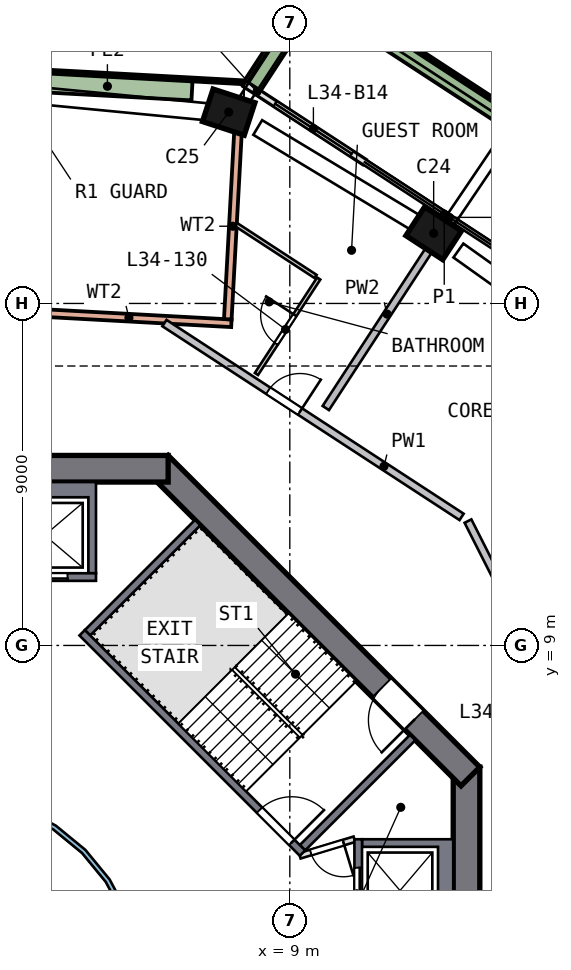
"""IFC4 building model, lengths in metres.
Left out: names, types, materials, properties, quantities, classifications, styles, units other than length and angle.
Written with IfcOpenShell. Run it as: python <this file> out.ifc"""

import sys

from ifc_helpers import new_model, si_unit, direction, frame, frame_2d, origin, origin_2d, place, context, subcontext, project, spatial, polyline, rectangle, outline, extrude, element, fill, save


model = new_model("IFC4")
c1 = context("Model", 3, precision=1e-05, world=origin(), true_north=direction((0.0, 1.0)))
c2 = subcontext(c1, "Body", "Model", "MODEL_VIEW")
j1 = project(units=[si_unit("LENGTHUNIT", "METRE"), si_unit("PLANEANGLEUNIT", "RADIAN")], contexts=[c1])
p1 = place(None, origin())
s1 = spatial("IfcSite", under=j1, at=p1, CompositionType="ELEMENT")
p2 = place(p1, origin())
s2 = spatial("IfcBuilding", under=s1, at=p2, CompositionType="ELEMENT")
p3 = place(p2, frame((0.0, 0.0, 143.5)))
s3 = spatial("IfcBuildingStorey", under=s2, at=p3, CompositionType="ELEMENT", Elevation=143.5)
p4 = place(p3, frame((12.899, 19.773, 0.0), z_axis=(-0.094531133, 0.060536429, 0.993679629), x_axis=(-0.832224418, 0.54295729, -0.112249269)))
e1 = element("IfcColumn", 1, at=p4, inside=s3, PredefinedType="COLUMN", context=c2, shape_type="SweptSolid", body=[
    extrude(rectangle(XDim=1.15, YDim=0.9, at=origin_2d()), origin(), (0.0, 0.0, 1.0), 3.21),
])
p5 = place(p3, frame((7.524, 22.993, 0.0), z_axis=(-0.109630225, 0.034820141, 0.993362357), x_axis=(0.944169139, -0.308730223, 0.115022986)))
e2 = element("IfcColumn", 2, at=p5, inside=s3, PredefinedType="COLUMN", context=c2, shape_type="SweptSolid", body=[
    extrude(rectangle(XDim=1.15, YDim=0.9, at=origin_2d()), origin(), (0.0, 0.0, 1.0), 3.211),
])
p6 = place(p3, frame((13.65, -5.799, 0.0), z_axis=(0.0, 0.0, 1.0), x_axis=(0.0, 1.0, 0.0)))
e3 = element("IfcWall", 3, at=p6, inside=s3, PredefinedType="SHEAR", context=c2, shape_type="SweptSolid", body=[
    extrude(rectangle(XDim=11.598, YDim=0.7, at=frame_2d((5.799, 0.0))), origin(), (0.0, 0.0, 1.0), 3.5),
])
p7 = place(p6, frame((4.899, 0.0, 0.0)))
e4 = element("IfcOpeningElement", 4, at=p7, cuts=e3, PredefinedType="OPENING", context=c2, shape_type="SweptSolid", body=[
    extrude(rectangle(XDim=1.8, YDim=2.1, at=frame_2d((0.9, 1.05))), frame((0.0, 0.36, 0.0), z_axis=(0.0, -1.0, 0.0), x_axis=(1.0, 0.0, 0.0)), (0.0, 0.0, 1.0), 0.72),
])
p8 = place(p3, frame((13.752, 5.552, 0.0), z_axis=(0.0, 0.0, 1.0), x_axis=(-0.707106781, 0.707106781, 0.0)))
e5 = element("IfcWall", 5, at=p8, inside=s3, PredefinedType="SHEAR", context=c2, shape_type="SweptSolid", body=[
    extrude(rectangle(XDim=11.598, YDim=0.7, at=frame_2d((5.799, 0.0))), origin(), (0.0, 0.0, 1.0), 3.5),
])
p9 = place(p8, frame((2.099, 0.0, 0.0)))
e6 = element("IfcOpeningElement", 6, at=p9, cuts=e5, PredefinedType="OPENING", context=c2, shape_type="SweptSolid", body=[
    extrude(rectangle(XDim=1.2, YDim=2.1, at=frame_2d((0.6, 1.05))), frame((0.0, 0.36, 0.0), z_axis=(0.0, -1.0, 0.0), x_axis=(1.0, 0.0, 0.0)), (0.0, 0.0, 1.0), 0.72),
])
p10 = place(p3, frame((5.799, 13.65, 0.0), z_axis=(0.0, 0.0, 1.0), x_axis=(-1.0, 0.0, 0.0)))
e7 = element("IfcWall", 7, at=p10, inside=s3, PredefinedType="SHEAR", context=c2, shape_type="SweptSolid", body=[
    extrude(rectangle(XDim=11.598, YDim=0.7, at=frame_2d((5.799, 0.0))), origin(), (0.0, 0.0, 1.0), 3.5),
])
p11 = place(p10, frame((4.899, 0.0, 0.0)))
e8 = element("IfcOpeningElement", 8, at=p11, cuts=e7, PredefinedType="OPENING", context=c2, shape_type="SweptSolid", body=[
    extrude(rectangle(XDim=1.8, YDim=2.1, at=frame_2d((0.9, 1.05))), frame((0.0, 0.36, 0.0), z_axis=(0.0, -1.0, 0.0), x_axis=(1.0, 0.0, 0.0)), (0.0, 0.0, 1.0), 0.72),
])
p12 = place(p3, frame((10.961, 21.724, 0.0), z_axis=(0.0, 0.0, 1.0), x_axis=(-0.8375277, 0.546394868, 0.0)))
e9 = element("IfcWall", 9, at=p12, inside=s3, PredefinedType="SOLIDWALL", context=c2, shape_type="SweptSolid", body=[
    extrude(rectangle(XDim=3.75, YDim=0.15, at=frame_2d((1.875, 0.0))), origin(), (0.0, 0.0, 1.0), 2.475),
])
p13 = place(p12, frame((0.4, 0.0, 0.0)))
e10 = element("IfcOpeningElement", 10, at=p13, cuts=e9, PredefinedType="OPENING", context=c2, shape_type="SweptSolid", body=[
    extrude(rectangle(XDim=2.4, YDim=2.4, at=frame_2d((1.2, 1.2))), frame((0.0, 0.085, 0.0), z_axis=(0.0, -1.0, 0.0), x_axis=(1.0, 0.0, 0.0)), (0.0, 0.0, 1.0), 0.17),
])
p14 = place(p3, frame((20.916, 18.841, 0.0), z_axis=(0.0, 0.0, 1.0), x_axis=(-0.837521399, 0.546404526, 0.0)))
e11 = element("IfcWall", 11, at=p14, inside=s3, PredefinedType="SOLIDWALL", context=c2, shape_type="SweptSolid", body=[
    extrude(rectangle(XDim=13.723, YDim=0.5, at=frame_2d((6.862, 0.0))), origin(), (0.0, 0.0, 1.0), 0.7),
])
p15 = place(p3, frame((9.495, 25.993, 0.0), z_axis=(0.0, 0.0, 1.0), x_axis=(-0.546427803, -0.837506212, 0.0)))
e12 = element("IfcWall", 12, at=p15, inside=s3, PredefinedType="SOLIDWALL", context=c2, shape_type="SweptSolid", body=[
    extrude(rectangle(XDim=2.699, YDim=0.5, at=frame_2d((1.35, 0.0))), origin(), (0.0, 0.0, 1.0), 0.7),
])
p16 = place(p3, frame((-5.518, 18.186, 0.0), z_axis=(0.0, 0.0, 1.0), x_axis=(0.99851788, -0.054424661, 0.0)))
e13 = element("IfcWall", 13, at=p16, inside=s3, PredefinedType="SOLIDWALL", context=c2, shape_type="SweptSolid", body=[
    extrude(rectangle(XDim=13.0, YDim=0.2, at=frame_2d((6.5, 0.0))), origin(), (0.0, 0.0, 1.0), 3.19),
])
p17 = place(p16, frame((5.6, 0.0, 0.0)))
e14 = element("IfcOpeningElement", 14, at=p17, cuts=e13, PredefinedType="OPENING", context=c2, shape_type="SweptSolid", body=[
    extrude(rectangle(XDim=1.8, YDim=2.4, at=frame_2d((0.9, 1.2))), frame((0.0, 0.11, 0.0), z_axis=(0.0, -1.0, 0.0), x_axis=(1.0, 0.0, 0.0)), (0.0, 0.0, 1.0), 0.22),
])
p18 = place(p3, frame((7.635, 22.48, 0.0), z_axis=(0.0, 0.0, 1.0), x_axis=(-0.054411249, -0.998518611, 0.0)))
e15 = element("IfcWall", 15, at=p18, inside=s3, PredefinedType="SOLIDWALL", context=c2, shape_type="SweptSolid", body=[
    extrude(rectangle(XDim=4.904, YDim=0.2, at=frame_2d((2.452, 0.0))), origin(), (0.0, 0.0, 1.0), 3.19),
])
p19 = place(p3, frame((7.728, 23.823, 0.0), z_axis=(0.0, 0.0, 1.0), x_axis=(-0.998517155, 0.054437952, 0.0)))
e16 = element("IfcWall", 16, at=p19, inside=s3, PredefinedType="SOLIDWALL", context=c2, shape_type="SweptSolid", body=[
    extrude(rectangle(XDim=12.84, YDim=0.1, at=frame_2d((6.42, 0.0))), origin(), (0.0, 0.0, 1.0), 0.7),
])
p20 = place(p3, frame((6.426, 23.594, 0.0), z_axis=(0.0, 0.0, 1.0), x_axis=(-0.998516629, 0.054447613, 0.0)))
e17 = element("IfcWall", 17, at=p20, inside=s3, PredefinedType="SOLIDWALL", context=c2, shape_type="SweptSolid", body=[
    extrude(rectangle(XDim=4.457, YDim=0.5, at=frame_2d((2.229, 0.0))), origin(), (0.0, 0.0, 1.0), 0.7),
])
p21 = place(p3, origin())
e18 = element("IfcWall", 18, at=p21, inside=s3, PredefinedType="SOLIDWALL", context=c2, shape_type="SweptSolid", body=[
    extrude(outline(polyline([(13.3, 3.9), (13.3, 1.2), (10.9, 1.2), (10.9, 1.4), (12.9, 1.4), (12.9, 3.7), (10.9, 3.7), (10.9, 3.9), (13.3, 3.9)])), origin(), (0.0, 0.0, 1.0), 3.19),
])
p22 = place(p3, frame((10.8, 1.2, 0.0), z_axis=(0.0, 0.0, 1.0), x_axis=(0.0, 1.0, 0.0)))
e19 = element("IfcWall", 19, at=p22, inside=s3, PredefinedType="SOLIDWALL", context=c2, shape_type="SweptSolid", body=[
    extrude(rectangle(XDim=2.7, YDim=0.2, at=frame_2d((1.35, 0.0))), origin(), (0.0, 0.0, 1.0), 3.19),
])
p23 = place(p22, frame((0.75, 0.0, 0.0)))
e20 = element("IfcOpeningElement", 20, at=p23, cuts=e19, PredefinedType="OPENING", context=c2, shape_type="SweptSolid", body=[
    extrude(rectangle(XDim=1.2, YDim=2.1, at=frame_2d((0.6, 1.05))), frame((0.0, 0.11, 0.0), z_axis=(0.0, -1.0, 0.0), x_axis=(1.0, 0.0, 0.0)), (0.0, 0.0, 1.0), 0.22),
])
p24 = place(p3, origin())
e21 = element("IfcWall", 21, at=p24, inside=s3, PredefinedType="SOLIDWALL", context=c2, shape_type="SweptSolid", body=[
    extrude(outline(polyline([(3.9, 13.3), (3.9, 10.9), (3.7, 10.9), (3.7, 12.9), (1.4, 12.9), (1.4, 10.9), (1.2, 10.9), (1.2, 13.3), (3.9, 13.3)])), origin(), (0.0, 0.0, 1.0), 3.19),
])
p25 = place(p3, frame((1.2, 10.8, 0.0), z_axis=(0.0, 0.0, 1.0), x_axis=(1.0, 0.0, 0.0)))
e22 = element("IfcWall", 22, at=p25, inside=s3, PredefinedType="SOLIDWALL", context=c2, shape_type="SweptSolid", body=[
    extrude(rectangle(XDim=2.7, YDim=0.2, at=frame_2d((1.35, 0.0))), origin(), (0.0, 0.0, 1.0), 3.19),
])
p26 = place(p25, frame((0.75, 0.0, 0.0)))
e23 = element("IfcOpeningElement", 23, at=p26, cuts=e22, PredefinedType="OPENING", context=c2, shape_type="SweptSolid", body=[
    extrude(rectangle(XDim=1.2, YDim=2.1, at=frame_2d((0.6, 1.05))), frame((0.0, 0.11, 0.0), z_axis=(0.0, -1.0, 0.0), x_axis=(1.0, 0.0, 0.0)), (0.0, 0.0, 1.0), 0.22),
])
p27 = place(p3, frame((3.535, 9.334, 0.0), z_axis=(0.0, 0.0, 1.0), x_axis=(0.707106781, -0.707106781, 0.0)))
e24 = element("IfcWall", 24, at=p27, inside=s3, PredefinedType="SOLIDWALL", context=c2, shape_type="SweptSolid", body=[
    extrude(rectangle(XDim=8.2, YDim=0.2, at=frame_2d((4.1, 0.0))), origin(), (0.0, 0.0, 1.0), 3.19),
])
p28 = place(p27, frame((6.6, 0.0, 0.0)))
e25 = element("IfcOpeningElement", 25, at=p28, cuts=e24, PredefinedType="OPENING", context=c2, shape_type="SweptSolid", body=[
    extrude(rectangle(XDim=1.2, YDim=2.1, at=frame_2d((0.6, 1.05))), frame((0.0, 0.11, 0.0), z_axis=(0.0, -1.0, 0.0), x_axis=(1.0, 0.0, 0.0)), (0.0, 0.0, 1.0), 0.22),
])
for number, where, z_axis, x_axis in (
    (26, (9.334, 3.677, 0.0), (0.0, 0.0, 1.0), (0.707, 0.707, 0.0)),
    (27, (3.677, 9.334, 0.0), (0.0, 0.0, 1.0), (0.707, 0.707, 0.0)),
):
    element("IfcWall", number, at=place(p3, frame(where, z_axis=z_axis, x_axis=x_axis)), inside=s3, PredefinedType="SOLIDWALL", context=c2, shape_type="SweptSolid", body=[
        extrude(rectangle(XDim=4.1, YDim=0.2, at=frame_2d((2.05, 0.0))), origin(), (0.0, 0.0, 1.0), 3.19),
    ])
p29 = place(p3, frame((10.7, 3.9, 0.0), z_axis=(0.0, 0.0, 1.0), x_axis=(-0.957084567, -0.289808785, 0.0)))
e28 = element("IfcWall", 28, at=p29, inside=s3, PredefinedType="PARTITIONING", context=c2, shape_type="SweptSolid", body=[
    extrude(rectangle(XDim=1.501, YDim=0.15, at=frame_2d((0.75, 0.0))), origin(), (0.0, 0.0, 1.0), 3.19),
])
p30 = place(p29, frame((0.301, 0.0, 0.0)))
e29 = element("IfcOpeningElement", 29, at=p30, cuts=e28, PredefinedType="OPENING", context=c2, shape_type="SweptSolid", body=[
    extrude(rectangle(XDim=0.9, YDim=2.1, at=frame_2d((0.45, 1.05))), frame((0.0, 0.085, 0.0), z_axis=(0.0, -1.0, 0.0), x_axis=(1.0, 0.0, 0.0)), (0.0, 0.0, 1.0), 0.17),
])
p31 = place(p3, origin())
e30 = element("IfcWall", 30, at=p31, inside=s3, PredefinedType="SOLIDWALL", context=c2, shape_type="SweptSolid", body=[
    extrude(outline(polyline([(5.021, -0.999), (4.73, -1.959), (4.257, -2.844), (3.62, -3.62), (2.844, -4.257), (1.959, -4.73), (0.999, -5.021), (0.0, -5.12), (-0.999, -5.021), (-1.959, -4.73), (-2.844, -4.257), (-3.62, -3.62), (-4.257, -2.844), (-4.73, -1.959), (-5.021, -0.999), (-5.12, 0.0), (-5.021, 0.999), (-4.73, 1.959), (-4.257, 2.844), (-3.62, 3.62), (-2.844, 4.257), (-1.959, 4.73), (-0.999, 5.021), (0.0, 5.12), (0.999, 5.021), (1.959, 4.73), (2.844, 4.257), (3.62, 3.62), (4.257, 2.844), (4.73, 1.959), (5.021, 0.999), (5.12, 0.0), (5.021, -0.999)]), holes=[polyline([(4.904, 0.976), (4.619, 1.913), (4.157, 2.778), (3.535, 3.535), (2.778, 4.157), (1.913, 4.619), (0.976, 4.904), (0.0, 5.0), (-0.976, 4.904), (-1.913, 4.619), (-2.778, 4.157), (-3.535, 3.535), (-4.157, 2.778), (-4.619, 1.913), (-4.904, 0.976), (-5.0, 0.0), (-4.904, -0.976), (-4.619, -1.913), (-4.157, -2.778), (-3.535, -3.535), (-2.778, -4.157), (-1.913, -4.619), (-0.976, -4.904), (0.0, -5.0), (0.976, -4.904), (1.913, -4.619), (2.778, -4.157), (3.535, -3.535), (4.157, -2.778), (4.619, -1.913), (4.904, -0.976), (5.0, 0.0), (4.904, 0.976)])]), origin(), (0.0, 0.0, 1.0), 3.19),
])
p32 = place(p3, frame((5.701, 17.484, 0.0), z_axis=(0.0, 0.0, 1.0), x_axis=(0.83752891, -0.546393013, 0.0)))
e31 = element("IfcWall", 31, at=p32, inside=s3, PredefinedType="SOLIDWALL", context=c2, shape_type="SweptSolid", body=[
    extrude(rectangle(XDim=9.336, YDim=0.2, at=frame_2d((4.668, 0.0))), origin(), (0.0, 0.0, 1.0), 3.19),
])
p33 = place(p32, frame((3.26, 0.0, 0.0)))
e32 = element("IfcOpeningElement", 32, at=p33, cuts=e31, PredefinedType="OPENING", context=c2, shape_type="SweptSolid", body=[
    extrude(rectangle(XDim=1.0, YDim=2.1, at=frame_2d((0.5, 1.05))), frame((0.0, 0.11, 0.0), z_axis=(0.0, -1.0, 0.0), x_axis=(1.0, 0.0, 0.0)), (0.0, 0.0, 1.0), 0.22),
])
p34 = place(p3, frame((13.688, 12.273, 0.0), z_axis=(0.0, 0.0, 1.0), x_axis=(0.452112705, -0.891960818, 0.0)))
e33 = element("IfcWall", 33, at=p34, inside=s3, PredefinedType="SOLIDWALL", context=c2, shape_type="SweptSolid", body=[
    extrude(rectangle(XDim=9.316, YDim=0.2, at=frame_2d((4.658, 0.0))), origin(), (0.0, 0.0, 1.0), 3.19),
])
p35 = place(p34, frame((5.15, 0.0, 0.0)))
e34 = element("IfcOpeningElement", 34, at=p35, cuts=e33, PredefinedType="OPENING", context=c2, shape_type="SweptSolid", body=[
    extrude(rectangle(XDim=1.0, YDim=2.1, at=frame_2d((0.5, 1.05))), frame((0.0, 0.11, 0.0), z_axis=(0.0, -1.0, 0.0), x_axis=(1.0, 0.0, 0.0)), (0.0, 0.0, 1.0), 0.22),
])
p36 = place(p3, frame((9.948, 15.248, 0.0), z_axis=(0.0, 0.0, 1.0), x_axis=(0.546387636, 0.837532418, 0.0)))
e35 = element("IfcWall", 35, at=p36, inside=s3, PredefinedType="SOLIDWALL", context=c2, shape_type="SweptSolid", body=[
    extrude(rectangle(XDim=5.903, YDim=0.2, at=frame_2d((2.951, 0.0))), origin(), (0.0, 0.0, 1.0), 3.19),
])
p37 = place(p3, frame((7.586, 20.075, 0.0), z_axis=(0.0, 0.0, 1.0), x_axis=(0.837560013, -0.546345335, 0.0)))
e36 = element("IfcWall", 36, at=p37, inside=s3, PredefinedType="PARTITIONING", context=c2, shape_type="SweptSolid", body=[
    extrude(rectangle(XDim=2.497, YDim=0.1, at=frame_2d((1.248, 0.0))), origin(), (0.0, 0.0, 1.0), 3.19),
])
p38 = place(p3, frame((8.122, 16.143, 0.0), z_axis=(0.0, 0.0, 1.0), x_axis=(0.546372035, 0.837542595, 0.0)))
e37 = element("IfcWall", 37, at=p38, inside=s3, PredefinedType="PARTITIONING", context=c2, shape_type="SweptSolid", body=[
    extrude(rectangle(XDim=3.0, YDim=0.1, at=frame_2d((1.5, 0.0))), origin(), (0.0, 0.0, 1.0), 3.19),
])
p39 = place(p38, frame((0.95, 0.0, 0.0)))
e38 = element("IfcOpeningElement", 38, at=p39, cuts=e37, PredefinedType="OPENING", context=c2, shape_type="SweptSolid", body=[
    extrude(rectangle(XDim=0.9, YDim=2.1, at=frame_2d((0.45, 1.05))), frame((0.0, 0.06, 0.0), z_axis=(0.0, -1.0, 0.0), x_axis=(1.0, 0.0, 0.0)), (0.0, 0.0, 1.0), 0.12),
])
p40 = place(p13, origin())
e39 = element("IfcDoor", 39, at=p40, inside=s3, OperationType="SLIDING_TO_RIGHT", PredefinedType="DOOR", context=c2, shape_type="SweptSolid", body=[
    extrude(rectangle(XDim=2.4, YDim=2.4, at=frame_2d((1.2, 1.2))), frame((0.0, 0.025, 0.0), z_axis=(0.0, -1.0, 0.0), x_axis=(1.0, 0.0, 0.0)), (0.0, 0.0, 1.0), 0.05),
])
fill(e10, e39)
p41 = place(p23, origin())
e40 = element("IfcDoor", 40, at=p41, inside=s3, OperationType="DOUBLE_DOOR_SLIDING", PredefinedType="DOOR", context=c2, shape_type="SweptSolid", body=[
    extrude(rectangle(XDim=1.2, YDim=2.1, at=frame_2d((0.6, 1.05))), frame((0.0, 0.025, 0.0), z_axis=(0.0, -1.0, 0.0), x_axis=(1.0, 0.0, 0.0)), (0.0, 0.0, 1.0), 0.05),
])
fill(e20, e40)
p42 = place(p26, origin())
e41 = element("IfcDoor", 41, at=p42, inside=s3, OperationType="DOUBLE_DOOR_SLIDING", PredefinedType="DOOR", context=c2, shape_type="SweptSolid", body=[
    extrude(rectangle(XDim=1.2, YDim=2.1, at=frame_2d((0.6, 1.05))), frame((0.0, 0.025, 0.0), z_axis=(0.0, -1.0, 0.0), x_axis=(1.0, 0.0, 0.0)), (0.0, 0.0, 1.0), 0.05),
])
fill(e23, e41)
p43 = place(p28, origin())
e42 = element("IfcDoor", 42, at=p43, inside=s3, OperationType="SINGLE_SWING_RIGHT", PredefinedType="DOOR", context=c2, shape_type="SweptSolid", body=[
    extrude(rectangle(XDim=1.2, YDim=2.1, at=frame_2d((0.6, 1.05))), frame((0.0, 0.025, 0.0), z_axis=(0.0, -1.0, 0.0), x_axis=(1.0, 0.0, 0.0)), (0.0, 0.0, 1.0), 0.05),
])
fill(e25, e42)
p44 = place(p9, origin())
e43 = element("IfcDoor", 43, at=p44, inside=s3, OperationType="SINGLE_SWING_LEFT", PredefinedType="DOOR", context=c2, shape_type="SweptSolid", body=[
    extrude(rectangle(XDim=1.2, YDim=2.1, at=frame_2d((0.6, 1.05))), frame((0.0, 0.025, 0.0), z_axis=(0.0, -1.0, 0.0), x_axis=(1.0, 0.0, 0.0)), (0.0, 0.0, 1.0), 0.05),
])
fill(e6, e43)
p45 = place(p30, origin())
e44 = element("IfcDoor", 44, at=p45, inside=s3, OperationType="SINGLE_SWING_LEFT", PredefinedType="DOOR", context=c2, shape_type="SweptSolid", body=[
    extrude(rectangle(XDim=0.9, YDim=2.1, at=frame_2d((0.45, 1.05))), frame((0.0, 0.025, 0.0), z_axis=(0.0, -1.0, 0.0), x_axis=(1.0, 0.0, 0.0)), (0.0, 0.0, 1.0), 0.05),
])
fill(e29, e44)
p46 = place(p33, origin())
e45 = element("IfcDoor", 45, at=p46, inside=s3, OperationType="SINGLE_SWING_RIGHT", PredefinedType="DOOR", context=c2, shape_type="SweptSolid", body=[
    extrude(rectangle(XDim=1.0, YDim=2.1, at=frame_2d((0.5, 1.05))), frame((0.0, 0.025, 0.0), z_axis=(0.0, -1.0, 0.0), x_axis=(1.0, 0.0, 0.0)), (0.0, 0.0, 1.0), 0.05),
])
fill(e32, e45)
p47 = place(p39, origin())
e46 = element("IfcDoor", 46, at=p47, inside=s3, OperationType="SINGLE_SWING_RIGHT", PredefinedType="DOOR", context=c2, shape_type="SweptSolid", body=[
    extrude(rectangle(XDim=0.9, YDim=2.1, at=frame_2d((0.45, 1.05))), frame((0.0, 0.025, 0.0), z_axis=(0.0, -1.0, 0.0), x_axis=(1.0, 0.0, 0.0)), (0.0, 0.0, 1.0), 0.05),
])
fill(e38, e46)
save(model, sys.argv[1])
